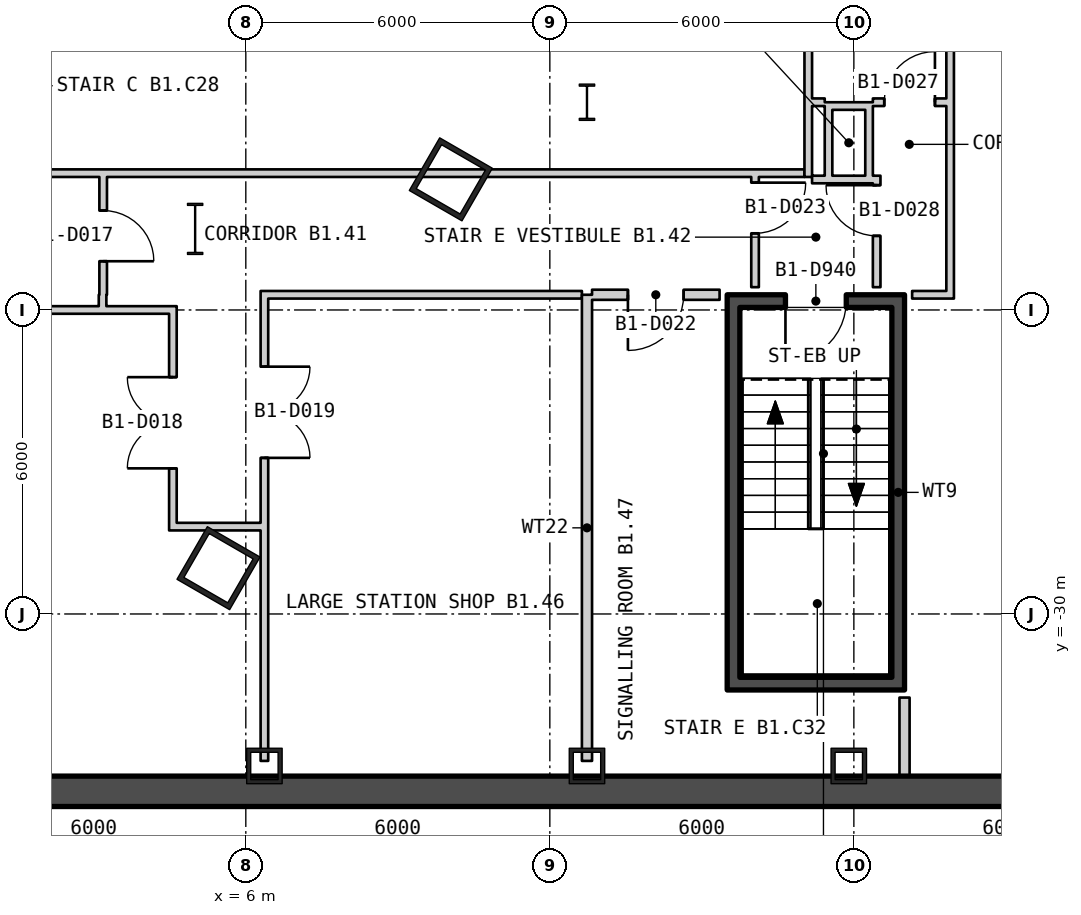
"""IFC4 building model, lengths in metres.
Left out: names, types, materials, properties, quantities, classifications, styles, units other than length and angle.
Written with IfcOpenShell. Run it as: python <this file> out.ifc"""

import sys

from ifc_helpers import new_model, si_unit, direction, frame, frame_2d, origin, origin_2d, place, context, subcontext, project, spatial, rectangle, hollow_rectangle, i_section, extrude, element, fill, save


model = new_model("IFC4")
c1 = context("Model", 3, precision=1e-05, world=origin(), true_north=direction((0.0, 1.0)))
c2 = subcontext(c1, "Body", "Model", "MODEL_VIEW")
j1 = project(units=[si_unit("LENGTHUNIT", "METRE"), si_unit("PLANEANGLEUNIT", "RADIAN")], contexts=[c1])
p1 = place(None, origin())
s1 = spatial("IfcSite", under=j1, at=p1, CompositionType="ELEMENT")
p2 = place(p1, origin())
s2 = spatial("IfcBuilding", under=s1, at=p2, CompositionType="ELEMENT")
p3 = place(p2, frame((0.0, 0.0, -5.7)))
s3 = spatial("IfcBuildingStorey", under=s2, at=p3, CompositionType="ELEMENT", Elevation=-5.7)
for number, where, z_axis, x_axis in (
    (1, (5.461, -29.096, 0.0), (0.0, 0.0, 1.0), (0.5, 0.866, 0.0)),
    (2, (10.046, -21.422, 0.0), (0.0, 0.0, 1.0), (0.5, 0.866, 0.0)),
):
    element("IfcColumn", number, at=place(p3, frame(where, z_axis=z_axis, x_axis=x_axis)), inside=s3, PredefinedType="COLUMN", context=c2, shape_type="SweptSolid", body=[
        extrude(hollow_rectangle(XDim=1.2, YDim=1.2, WallThickness=0.1, at=origin_2d()), origin(), (0.0, 0.0, 1.0), 5.7),
    ])
p4 = place(p3, frame((5.0, -22.4, 0.0), z_axis=(0.0, 0.0, 1.0), x_axis=(1.0, 0.0, 0.0)))
e3 = element("IfcColumn", 3, at=p4, inside=s3, PredefinedType="COLUMN", context=c2, shape_type="SweptSolid", body=[
    extrude(i_section(OverallWidth=0.302, OverallDepth=1.008, WebThickness=0.021, FlangeThickness=0.04, at=origin_2d()), origin(), (0.0, 0.0, 1.0), 5.7),
])
for number, where, z_axis, x_axis in (
    (4, (6.367, -33.0, 0.0), (0.0, 0.0, 1.0), (1.0, 0.0, 0.0)),
    (5, (12.733, -33.0, 0.0), (0.0, 0.0, 1.0), (1.0, 0.0, 0.0)),
    (6, (17.9, -33.0, 0.0), (0.0, 0.0, 1.0), (1.0, 0.0, 0.0)),
):
    element("IfcColumn", number, at=place(p3, frame(where, z_axis=z_axis, x_axis=x_axis)), inside=s3, PredefinedType="COLUMN", context=c2, shape_type="SweptSolid", body=[
        extrude(hollow_rectangle(XDim=0.7, YDim=0.7, WallThickness=0.08, at=origin_2d()), origin(), (0.0, 0.0, 1.0), 5.7),
    ])
p5 = place(p3, frame((12.733, -19.9, 0.0), z_axis=(0.0, 0.0, 1.0), x_axis=(1.0, 0.0, 0.0)))
e7 = element("IfcColumn", 7, at=p5, inside=s3, PredefinedType="COLUMN", context=c2, shape_type="SweptSolid", body=[
    extrude(i_section(OverallWidth=0.304, OverallDepth=0.716, WebThickness=0.021, FlangeThickness=0.04, at=origin_2d()), origin(), (0.0, 0.0, 1.0), 5.25),
])
p6 = place(p3, frame((-39.0, -33.5, -0.4), z_axis=(0.0, 0.0, 1.0), x_axis=(1.0, 0.0, 0.0)))
e8 = element("IfcWall", 8, at=p6, inside=s3, PredefinedType="STANDARD", context=c2, shape_type="SweptSolid", body=[
    extrude(rectangle(XDim=78.0, YDim=0.6, at=frame_2d((39.0, 0.0))), origin(), (0.0, 0.0, 1.0), 5.7),
])
for number, where, z_axis, x_axis in (
    (9, (15.625, -31.25, 0.0), (0.0, 0.0, 1.0), (0.0, 1.0, 0.0)),
    (10, (18.875, -31.25, 0.0), (0.0, 0.0, 1.0), (0.0, 1.0, 0.0)),
):
    element("IfcWall", number, at=place(p3, frame(where, z_axis=z_axis, x_axis=x_axis)), inside=s3, PredefinedType="SHEAR", context=c2, shape_type="SweptSolid", body=[
        extrude(rectangle(XDim=7.3, YDim=0.25, at=frame_2d((3.65, 0.0))), origin(), (0.0, 0.0, 1.0), 5.25),
    ])
p7 = place(p3, frame((15.5, -31.375, 0.0), z_axis=(0.0, 0.0, 1.0), x_axis=(1.0, 0.0, 0.0)))
e11 = element("IfcWall", 11, at=p7, inside=s3, PredefinedType="SHEAR", context=c2, shape_type="SweptSolid", body=[
    extrude(rectangle(XDim=3.5, YDim=0.25, at=frame_2d((1.75, 0.0))), origin(), (0.0, 0.0, 1.0), 5.25),
])
p8 = place(p3, frame((15.5, -23.825, 0.0), z_axis=(0.0, 0.0, 1.0), x_axis=(1.0, 0.0, 0.0)))
e12 = element("IfcWall", 12, at=p8, inside=s3, PredefinedType="SHEAR", context=c2, shape_type="SweptSolid", body=[
    extrude(rectangle(XDim=3.5, YDim=0.25, at=frame_2d((1.75, 0.0))), origin(), (0.0, 0.0, 1.0), 5.25),
])
p9 = place(p8, frame((1.15, 0.0, 0.0)))
e13 = element("IfcOpeningElement", 13, at=p9, cuts=e12, PredefinedType="OPENING", context=c2, shape_type="SweptSolid", body=[
    extrude(rectangle(XDim=1.2, YDim=2.1, at=frame_2d((0.6, 1.05))), frame((0.0, 0.135, 0.0), z_axis=(0.0, -1.0, 0.0), x_axis=(1.0, 0.0, 0.0)), (0.0, 0.0, 1.0), 0.27),
])
p10 = place(p3, frame((-4.636, -24.0, 0.0), z_axis=(0.0, 0.0, 1.0), x_axis=(1.0, 0.0, 0.0)))
e14 = element("IfcWall", 14, at=p10, inside=s3, PredefinedType="PARTITIONING", context=c2, shape_type="SweptSolid", body=[
    extrude(rectangle(XDim=9.272, YDim=0.15, at=frame_2d((4.636, 0.0))), origin(), (0.0, 0.0, 1.0), 5.25),
])
p11 = place(p3, frame((1.7, -21.3, 0.0), z_axis=(0.0, 0.0, 1.0), x_axis=(1.0, 0.0, 0.0)))
e15 = element("IfcWall", 15, at=p11, inside=s3, PredefinedType="PARTITIONING", context=c2, shape_type="SweptSolid", body=[
    extrude(rectangle(XDim=15.325, YDim=0.15, at=frame_2d((7.662, 0.0))), origin(), (0.0, 0.0, 1.0), 5.25),
])
p12 = place(p3, frame((3.173, -23.925, 0.0), z_axis=(0.0, 0.0, 1.0), x_axis=(0.0, 1.0, 0.0)))
e16 = element("IfcWall", 16, at=p12, inside=s3, PredefinedType="PARTITIONING", context=c2, shape_type="SweptSolid", body=[
    extrude(rectangle(XDim=0.225, YDim=0.15, at=frame_2d((0.113, 0.0))), origin(), (0.0, 0.0, 1.0), 5.25),
])
p13 = place(p3, frame((3.185, -23.7, 0.0), z_axis=(0.0, 0.0, 1.0), x_axis=(0.0, 1.0, 0.0)))
e17 = element("IfcWall", 17, at=p13, inside=s3, PredefinedType="PARTITIONING", context=c2, shape_type="SweptSolid", body=[
    extrude(rectangle(XDim=2.325, YDim=0.15, at=frame_2d((1.163, 0.0))), origin(), (0.0, 0.0, 1.0), 5.25),
])
p14 = place(p13, frame((0.662, 0.0, 0.0)))
e18 = element("IfcOpeningElement", 18, at=p14, cuts=e17, PredefinedType="OPENING", context=c2, shape_type="SweptSolid", body=[
    extrude(rectangle(XDim=1.0, YDim=2.1, at=frame_2d((0.5, 1.05))), frame((0.0, 0.085, 0.0), z_axis=(0.0, -1.0, 0.0), x_axis=(1.0, 0.0, 0.0)), (0.0, 0.0, 1.0), 0.17),
])
p15 = place(p3, frame((4.561, -28.351, 0.0), z_axis=(0.0, 0.0, 1.0), x_axis=(0.0, 1.0, 0.0)))
e19 = element("IfcWall", 19, at=p15, inside=s3, PredefinedType="PARTITIONING", context=c2, shape_type="SweptSolid", body=[
    extrude(rectangle(XDim=4.276, YDim=0.15, at=frame_2d((2.138, 0.0))), origin(), (0.0, 0.0, 1.0), 5.25),
])
p16 = place(p15, frame((1.225, 0.0, 0.0)))
e20 = element("IfcOpeningElement", 20, at=p16, cuts=e19, PredefinedType="OPENING", context=c2, shape_type="SweptSolid", body=[
    extrude(rectangle(XDim=1.8, YDim=2.1, at=frame_2d((0.9, 1.05))), frame((0.0, 0.085, 0.0), z_axis=(0.0, -1.0, 0.0), x_axis=(1.0, 0.0, 0.0)), (0.0, 0.0, 1.0), 0.17),
])
p17 = place(p3, frame((4.636, -28.276, 0.0), z_axis=(0.0, 0.0, 1.0), x_axis=(1.0, 0.0, 0.0)))
e21 = element("IfcWall", 21, at=p17, inside=s3, PredefinedType="PARTITIONING", context=c2, shape_type="SweptSolid", body=[
    extrude(rectangle(XDim=1.656, YDim=0.15, at=frame_2d((0.828, 0.0))), origin(), (0.0, 0.0, 1.0), 5.25),
])
p18 = place(p3, frame((6.367, -32.9, 0.0), z_axis=(0.0, 0.0, 1.0), x_axis=(0.0, 1.0, 0.0)))
e22 = element("IfcWall", 22, at=p18, inside=s3, PredefinedType="PARTITIONING", context=c2, shape_type="SweptSolid", body=[
    extrude(rectangle(XDim=9.275, YDim=0.15, at=frame_2d((4.638, 0.0))), origin(), (0.0, 0.0, 1.0), 5.25),
])
p19 = place(p18, frame((5.981, 0.0, 0.0)))
e23 = element("IfcOpeningElement", 23, at=p19, cuts=e22, PredefinedType="OPENING", context=c2, shape_type="SweptSolid", body=[
    extrude(rectangle(XDim=1.8, YDim=2.1, at=frame_2d((0.9, 1.05))), frame((0.0, 0.085, 0.0), z_axis=(0.0, -1.0, 0.0), x_axis=(1.0, 0.0, 0.0)), (0.0, 0.0, 1.0), 0.17),
])
p20 = place(p3, frame((6.442, -23.7, 0.0), z_axis=(0.0, 0.0, 1.0), x_axis=(1.0, 0.0, 0.0)))
e24 = element("IfcWall", 24, at=p20, inside=s3, PredefinedType="PARTITIONING", context=c2, shape_type="SweptSolid", body=[
    extrude(rectangle(XDim=6.191, YDim=0.15, at=frame_2d((3.095, 0.0))), origin(), (0.0, 0.0, 1.0), 5.25),
])
p21 = place(p3, frame((12.733, -32.9, 0.0), z_axis=(0.0, 0.0, 1.0), x_axis=(0.0, 1.0, 0.0)))
e25 = element("IfcWall", 25, at=p21, inside=s3, PredefinedType="PARTITIONING", context=c2, shape_type="SweptSolid", body=[
    extrude(rectangle(XDim=9.2, YDim=0.2, at=frame_2d((4.6, 0.0))), origin(), (0.0, 0.0, 1.0), 5.25),
])
p22 = place(p3, frame((12.833, -23.7, 0.0), z_axis=(0.0, 0.0, 1.0), x_axis=(1.0, 0.0, 0.0)))
e26 = element("IfcWall", 26, at=p22, inside=s3, PredefinedType="PARTITIONING", context=c2, shape_type="SweptSolid", body=[
    extrude(rectangle(XDim=2.517, YDim=0.2, at=frame_2d((1.258, 0.0))), origin(), (0.0, 0.0, 1.0), 5.25),
])
p23 = place(p22, frame((0.708, 0.0, 0.0)))
e27 = element("IfcOpeningElement", 27, at=p23, cuts=e26, PredefinedType="OPENING", context=c2, shape_type="SweptSolid", body=[
    extrude(rectangle(XDim=1.1, YDim=2.1, at=frame_2d((0.55, 1.05))), frame((0.0, 0.11, 0.0), z_axis=(0.0, -1.0, 0.0), x_axis=(1.0, 0.0, 0.0)), (0.0, 0.0, 1.0), 0.22),
])
p24 = place(p3, frame((16.05, -23.55, 0.0), z_axis=(0.0, 0.0, 1.0), x_axis=(0.0, 1.0, 0.0)))
e28 = element("IfcWall", 28, at=p24, inside=s3, PredefinedType="PARTITIONING", context=c2, shape_type="SweptSolid", body=[
    extrude(rectangle(XDim=2.175, YDim=0.15, at=frame_2d((1.087, 0.0))), origin(), (0.0, 0.0, 1.0), 5.25),
])
p25 = place(p24, frame((1.063, 0.0, 0.0)))
e29 = element("IfcOpeningElement", 29, at=p25, cuts=e28, PredefinedType="OPENING", context=c2, shape_type="SweptSolid", body=[
    extrude(rectangle(XDim=1.0, YDim=2.1, at=frame_2d((0.5, 1.05))), frame((0.0, 0.085, 0.0), z_axis=(0.0, -1.0, 0.0), x_axis=(1.0, 0.0, 0.0)), (0.0, 0.0, 1.0), 0.17),
])
p26 = place(p3, frame((17.1, -21.375, 0.0), z_axis=(0.0, 0.0, 1.0), x_axis=(0.0, 1.0, 0.0)))
e30 = element("IfcWall", 30, at=p26, inside=s3, PredefinedType="PARTITIONING", context=c2, shape_type="SweptSolid", body=[
    extrude(rectangle(XDim=19.05, YDim=0.15, at=frame_2d((9.525, 0.0))), origin(), (0.0, 0.0, 1.0), 5.25),
])
for number, where, z_axis, x_axis in (
    (31, (17.175, -21.425, 0.0), (0.0, 0.0, 1.0), (1.0, 0.0, 0.0)),
    (32, (17.175, -19.9, 0.0), (0.0, 0.0, 1.0), (1.0, 0.0, 0.0)),
):
    element("IfcWall", number, at=place(p3, frame(where, z_axis=z_axis, x_axis=x_axis)), inside=s3, PredefinedType="PARTITIONING", context=c2, shape_type="SweptSolid", body=[
        extrude(rectangle(XDim=0.25, YDim=0.15, at=frame_2d((0.125, 0.0))), origin(), (0.0, 0.0, 1.0), 5.25),
    ])
p27 = place(p3, frame((17.5, -21.5, 0.0), z_axis=(0.0, 0.0, 1.0), x_axis=(0.0, 1.0, 0.0)))
e33 = element("IfcWall", 33, at=p27, inside=s3, PredefinedType="PARTITIONING", context=c2, shape_type="SweptSolid", body=[
    extrude(rectangle(XDim=1.6, YDim=0.15, at=frame_2d((0.8, 0.0))), origin(), (0.0, 0.0, 1.0), 5.25),
])
for number, where, z_axis, x_axis in (
    (34, (17.575, -21.425, 0.0), (0.0, 0.0, 1.0), (1.0, 0.0, 0.0)),
    (35, (17.575, -19.975, 0.0), (0.0, 0.0, 1.0), (1.0, 0.0, 0.0)),
):
    element("IfcWall", number, at=place(p3, frame(where, z_axis=z_axis, x_axis=x_axis)), inside=s3, PredefinedType="PARTITIONING", context=c2, shape_type="SweptSolid", body=[
        extrude(rectangle(XDim=0.65, YDim=0.15, at=frame_2d((0.325, 0.0))), origin(), (0.0, 0.0, 1.0), 5.25),
    ])
p28 = place(p3, frame((18.3, -21.5, 0.0), z_axis=(0.0, 0.0, 1.0), x_axis=(0.0, 1.0, 0.0)))
e36 = element("IfcWall", 36, at=p28, inside=s3, PredefinedType="PARTITIONING", context=c2, shape_type="SweptSolid", body=[
    extrude(rectangle(XDim=1.6, YDim=0.15, at=frame_2d((0.8, 0.0))), origin(), (0.0, 0.0, 1.0), 5.25),
])
p29 = place(p3, frame((18.375, -19.9, 0.0), z_axis=(0.0, 0.0, 1.0), x_axis=(1.0, 0.0, 0.0)))
e37 = element("IfcWall", 37, at=p29, inside=s3, PredefinedType="PARTITIONING", context=c2, shape_type="SweptSolid", body=[
    extrude(rectangle(XDim=1.45, YDim=0.15, at=frame_2d((0.725, 0.0))), origin(), (0.0, 0.0, 1.0), 5.25),
])
p30 = place(p29, frame((0.225, 0.0, 0.0)))
e38 = element("IfcOpeningElement", 38, at=p30, cuts=e37, PredefinedType="OPENING", context=c2, shape_type="SweptSolid", body=[
    extrude(rectangle(XDim=1.0, YDim=2.1, at=frame_2d((0.5, 1.05))), frame((0.0, 0.085, 0.0), z_axis=(0.0, -1.0, 0.0), x_axis=(1.0, 0.0, 0.0)), (0.0, 0.0, 1.0), 0.17),
])
p31 = place(p3, frame((18.45, -23.55, 0.0), z_axis=(0.0, 0.0, 1.0), x_axis=(0.0, 1.0, 0.0)))
e39 = element("IfcWall", 39, at=p31, inside=s3, PredefinedType="PARTITIONING", context=c2, shape_type="SweptSolid", body=[
    extrude(rectangle(XDim=2.2, YDim=0.15, at=frame_2d((1.1, 0.0))), origin(), (0.0, 0.0, 1.0), 5.25),
])
p32 = place(p31, frame((1.013, 0.0, 0.0)))
e40 = element("IfcOpeningElement", 40, at=p32, cuts=e39, PredefinedType="OPENING", context=c2, shape_type="SweptSolid", body=[
    extrude(rectangle(XDim=1.0, YDim=2.1, at=frame_2d((0.5, 1.05))), frame((0.0, 0.085, 0.0), z_axis=(0.0, -1.0, 0.0), x_axis=(1.0, 0.0, 0.0)), (0.0, 0.0, 1.0), 0.17),
])
p33 = place(p3, frame((19.0, -33.348, 0.0), z_axis=(0.0, 0.0, 1.0), x_axis=(0.0, 1.0, 0.0)))
e41 = element("IfcWall", 41, at=p33, inside=s3, PredefinedType="PARTITIONING", context=c2, shape_type="SweptSolid", body=[
    extrude(rectangle(XDim=1.698, YDim=0.2, at=frame_2d((0.849, 0.0))), origin(), (0.0, 0.0, 1.0), 5.25),
])
p34 = place(p3, frame((19.15, -23.7, 0.0), z_axis=(0.0, 0.0, 1.0), x_axis=(1.0, 0.0, 0.0)))
e42 = element("IfcWall", 42, at=p34, inside=s3, PredefinedType="PARTITIONING", context=c2, shape_type="SweptSolid", body=[
    extrude(rectangle(XDim=0.675, YDim=0.15, at=frame_2d((0.338, 0.0))), origin(), (0.0, 0.0, 1.0), 5.25),
])
p35 = place(p3, frame((19.9, -23.775, 0.0), z_axis=(0.0, 0.0, 1.0), x_axis=(0.0, 1.0, 0.0)))
e43 = element("IfcWall", 43, at=p35, inside=s3, PredefinedType="PARTITIONING", context=c2, shape_type="SweptSolid", body=[
    extrude(rectangle(XDim=21.187, YDim=0.15, at=frame_2d((10.594, 0.0))), origin(), (0.0, 0.0, 1.0), 5.25),
])
p36 = place(p35, frame((4.987, 0.0, 0.0)))
e44 = element("IfcOpeningElement", 44, at=p36, cuts=e43, PredefinedType="OPENING", context=c2, shape_type="SweptSolid", body=[
    extrude(rectangle(XDim=1.0, YDim=2.1, at=frame_2d((0.5, 1.05))), frame((0.0, 0.085, 0.0), z_axis=(0.0, -1.0, 0.0), x_axis=(1.0, 0.0, 0.0)), (0.0, 0.0, 1.0), 0.17),
])
p37 = place(p35, frame((9.886, 0.0, 0.0)))
e45 = element("IfcOpeningElement", 45, at=p37, cuts=e43, PredefinedType="OPENING", context=c2, shape_type="SweptSolid", body=[
    extrude(rectangle(XDim=1.8, YDim=2.1, at=frame_2d((0.9, 1.05))), frame((0.0, 0.085, 0.0), z_axis=(0.0, -1.0, 0.0), x_axis=(1.0, 0.0, 0.0)), (0.0, 0.0, 1.0), 0.17),
])
p38 = place(p35, frame((14.973, 0.0, 0.0)))
e46 = element("IfcOpeningElement", 46, at=p38, cuts=e43, PredefinedType="OPENING", context=c2, shape_type="SweptSolid", body=[
    extrude(rectangle(XDim=1.8, YDim=2.1, at=frame_2d((0.9, 1.05))), frame((0.0, 0.085, 0.0), z_axis=(0.0, -1.0, 0.0), x_axis=(1.0, 0.0, 0.0)), (0.0, 0.0, 1.0), 0.17),
])
p39 = place(p35, frame((19.062, 0.0, 0.0)))
e47 = element("IfcOpeningElement", 47, at=p39, cuts=e43, PredefinedType="OPENING", context=c2, shape_type="SweptSolid", body=[
    extrude(rectangle(XDim=1.0, YDim=2.1, at=frame_2d((0.5, 1.05))), frame((0.0, 0.085, 0.0), z_axis=(0.0, -1.0, 0.0), x_axis=(1.0, 0.0, 0.0)), (0.0, 0.0, 1.0), 0.17),
])
p40 = place(p3, frame((20.028, -14.827, 0.0), z_axis=(0.0, 0.0, 1.0), x_axis=(0.707106781187, -0.707106781187, 0.0)))
e48 = element("IfcWall", 48, at=p40, inside=s3, PredefinedType="PARTITIONING", context=c2, shape_type="SweptSolid", body=[
    extrude(rectangle(XDim=7.068, YDim=0.15, at=frame_2d((3.534, 0.0))), origin(), (0.0, 0.0, 1.0), 5.25),
])
p41 = place(p9, origin())
e49 = element("IfcDoor", 49, at=p41, inside=s3, OperationType="SINGLE_SWING_LEFT", PredefinedType="DOOR", context=c2, shape_type="SweptSolid", body=[
    extrude(rectangle(XDim=1.2, YDim=2.1, at=frame_2d((0.6, 1.05))), frame((0.0, 0.025, 0.0), z_axis=(0.0, -1.0, 0.0), x_axis=(1.0, 0.0, 0.0)), (0.0, 0.0, 1.0), 0.05),
])
fill(e13, e49)
p42 = place(p14, origin())
e50 = element("IfcDoor", 50, at=p42, inside=s3, OperationType="SINGLE_SWING_LEFT", PredefinedType="DOOR", context=c2, shape_type="SweptSolid", body=[
    extrude(rectangle(XDim=1.0, YDim=2.1, at=frame_2d((0.5, 1.05))), frame((0.0, 0.025, 0.0), z_axis=(0.0, -1.0, 0.0), x_axis=(1.0, 0.0, 0.0)), (0.0, 0.0, 1.0), 0.05),
])
fill(e18, e50)
p43 = place(p16, origin())
e51 = element("IfcDoor", 51, at=p43, inside=s3, OperationType="DOUBLE_DOOR_SINGLE_SWING", PredefinedType="DOOR", context=c2, shape_type="SweptSolid", body=[
    extrude(rectangle(XDim=1.8, YDim=2.1, at=frame_2d((0.9, 1.05))), frame((0.0, 0.025, 0.0), z_axis=(0.0, -1.0, 0.0), x_axis=(1.0, 0.0, 0.0)), (0.0, 0.0, 1.0), 0.05),
])
fill(e20, e51)
p44 = place(p19, origin())
e52 = element("IfcDoor", 52, at=p44, inside=s3, OperationType="DOUBLE_DOOR_SINGLE_SWING", PredefinedType="DOOR", context=c2, shape_type="SweptSolid", body=[
    extrude(rectangle(XDim=1.8, YDim=2.1, at=frame_2d((0.9, 1.05))), frame((0.0, 0.025, 0.0), z_axis=(0.0, -1.0, 0.0), x_axis=(1.0, 0.0, 0.0)), (0.0, 0.0, 1.0), 0.05),
])
fill(e23, e52)
p45 = place(p23, origin())
e53 = element("IfcDoor", 53, at=p45, inside=s3, OperationType="SINGLE_SWING_LEFT", PredefinedType="DOOR", context=c2, shape_type="SweptSolid", body=[
    extrude(rectangle(XDim=1.1, YDim=2.1, at=frame_2d((0.55, 1.05))), frame((0.0, 0.025, 0.0), z_axis=(0.0, -1.0, 0.0), x_axis=(1.0, 0.0, 0.0)), (0.0, 0.0, 1.0), 0.05),
])
fill(e27, e53)
p46 = place(p25, origin())
e54 = element("IfcDoor", 54, at=p46, inside=s3, OperationType="SINGLE_SWING_RIGHT", PredefinedType="DOOR", context=c2, shape_type="SweptSolid", body=[
    extrude(rectangle(XDim=1.0, YDim=2.1, at=frame_2d((0.5, 1.05))), frame((0.0, 0.025, 0.0), z_axis=(0.0, -1.0, 0.0), x_axis=(1.0, 0.0, 0.0)), (0.0, 0.0, 1.0), 0.05),
])
fill(e29, e54)
p47 = place(p30, origin())
e55 = element("IfcDoor", 55, at=p47, inside=s3, OperationType="SINGLE_SWING_LEFT", PredefinedType="DOOR", context=c2, shape_type="SweptSolid", body=[
    extrude(rectangle(XDim=1.0, YDim=2.1, at=frame_2d((0.5, 1.05))), frame((0.0, 0.025, 0.0), z_axis=(0.0, -1.0, 0.0), x_axis=(1.0, 0.0, 0.0)), (0.0, 0.0, 1.0), 0.05),
])
fill(e38, e55)
p48 = place(p32, origin())
e56 = element("IfcDoor", 56, at=p48, inside=s3, OperationType="SINGLE_SWING_LEFT", PredefinedType="DOOR", context=c2, shape_type="SweptSolid", body=[
    extrude(rectangle(XDim=1.0, YDim=2.1, at=frame_2d((0.5, 1.05))), frame((0.0, 0.025, 0.0), z_axis=(0.0, -1.0, 0.0), x_axis=(1.0, 0.0, 0.0)), (0.0, 0.0, 1.0), 0.05),
])
fill(e40, e56)
save(model, sys.argv[1])
